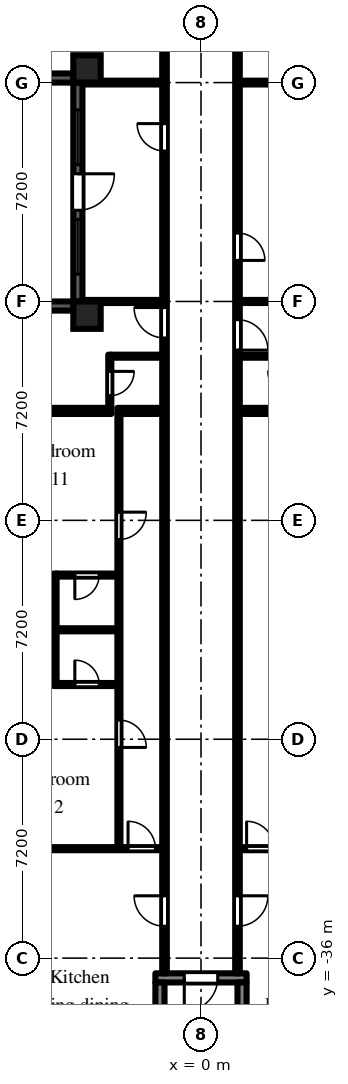
"""IFC4 building model, lengths in metres.
Left out: names, types, materials, properties, quantities, classifications, styles, units other than length and angle.
Written with IfcOpenShell. Run it as: python <this file> out.ifc"""

import sys

from ifc_helpers import new_model, si_unit, direction, frame, frame_2d, origin, origin_2d, place, context, subcontext, project, spatial, rectangle, extrude, element, fill, save


model = new_model("IFC4")
c1 = context("Model", 3, precision=1e-05, world=origin(), true_north=direction((0.0, 1.0)))
c2 = subcontext(c1, "Body", "Model", "MODEL_VIEW")
j1 = project(units=[si_unit("LENGTHUNIT", "METRE"), si_unit("PLANEANGLEUNIT", "RADIAN")], contexts=[c1])
p1 = place(None, origin())
s1 = spatial("IfcSite", under=j1, at=p1, CompositionType="ELEMENT")
p2 = place(p1, origin())
s2 = spatial("IfcBuilding", under=s1, at=p2, CompositionType="ELEMENT")
p3 = place(p2, frame((0.0, 0.0, 29.7)))
s3 = spatial("IfcBuildingStorey", under=s2, at=p3, CompositionType="ELEMENT", Elevation=29.7)
for number, where, z_axis, x_axis in (
    (1, (-3.75, -14.85, 0.0), (0.0, 0.0, 1.0), (1.0, 0.0, 0.0)),
    (2, (-3.75, -6.75, 0.0), (0.0, 0.0, 1.0), (1.0, 0.0, 0.0)),
):
    element("IfcColumn", number, at=place(p3, frame(where, z_axis=z_axis, x_axis=x_axis)), inside=s3, PredefinedType="COLUMN", context=c2, shape_type="SweptSolid", body=[
        extrude(rectangle(XDim=0.9, YDim=0.9, at=origin_2d()), origin(), (0.0, 0.0, 1.0), 3.0),
    ])
p4 = place(p3, frame((-7.2, -7.05, 0.0), z_axis=(0.0, 0.0, 1.0), x_axis=(1.0, 0.0, 0.0)))
e3 = element("IfcWall", 3, at=p4, inside=s3, PredefinedType="SOLIDWALL", context=c2, shape_type="SweptSolid", body=[
    extrude(rectangle(XDim=3.0, YDim=0.3, at=frame_2d((1.5, 0.0))), origin(), (0.0, 0.0, 1.0), 2.1),
])
p5 = place(p3, frame((-4.05, -7.2, 0.0), z_axis=(0.0, 0.0, 1.0), x_axis=(0.0, -1.0, 0.0)))
e4 = element("IfcWall", 4, at=p5, inside=s3, PredefinedType="SOLIDWALL", context=c2, shape_type="SweptSolid", body=[
    extrude(rectangle(XDim=7.2, YDim=0.3, at=frame_2d((3.6, 0.0))), origin(), (0.0, 0.0, 1.0), 2.1),
])
p6 = place(p5, frame((3.0, 0.0, 0.0)))
e5 = element("IfcOpeningElement", 5, at=p6, cuts=e4, PredefinedType="OPENING", context=c2, shape_type="SweptSolid", body=[
    extrude(rectangle(XDim=1.2, YDim=2.05, at=frame_2d((0.6, 1.025))), frame((0.0, 0.16, 0.0), z_axis=(0.0, -1.0, 0.0), x_axis=(1.0, 0.0, 0.0)), (0.0, 0.0, 1.0), 0.32),
])
p7 = place(p5, frame((0.9, 0.0, 0.2)))
e6 = element("IfcOpeningElement", 6, at=p7, cuts=e4, PredefinedType="OPENING", context=c2, shape_type="SweptSolid", body=[
    extrude(rectangle(XDim=1.8, YDim=1.85, at=frame_2d((0.9, 0.925))), frame((0.0, 0.16, 0.0), z_axis=(0.0, -1.0, 0.0), x_axis=(1.0, 0.0, 0.0)), (0.0, 0.0, 1.0), 0.32),
])
p8 = place(p5, frame((4.5, 0.0, 0.2)))
e7 = element("IfcOpeningElement", 7, at=p8, cuts=e4, PredefinedType="OPENING", context=c2, shape_type="SweptSolid", body=[
    extrude(rectangle(XDim=1.8, YDim=1.85, at=frame_2d((0.9, 0.925))), frame((0.0, 0.16, 0.0), z_axis=(0.0, -1.0, 0.0), x_axis=(1.0, 0.0, 0.0)), (0.0, 0.0, 1.0), 0.32),
])
p9 = place(p3, frame((-4.2, -14.55, 0.0), z_axis=(0.0, 0.0, 1.0), x_axis=(-1.0, 0.0, 0.0)))
e8 = element("IfcWall", 8, at=p9, inside=s3, PredefinedType="SOLIDWALL", context=c2, shape_type="SweptSolid", body=[
    extrude(rectangle(XDim=2.1, YDim=0.3, at=frame_2d((1.05, 0.0))), origin(), (0.0, 0.0, 1.0), 2.1),
])
p10 = place(p3, frame((-1.5, -36.65, 0.0), z_axis=(0.0, 0.0, 1.0), x_axis=(1.0, 0.0, 0.0)))
e9 = element("IfcWall", 9, at=p10, inside=s3, PredefinedType="SHEAR", context=c2, shape_type="SweptSolid", body=[
    extrude(rectangle(XDim=3.0, YDim=0.3, at=frame_2d((1.5, 0.0))), origin(), (0.0, 0.0, 1.0), 2.575),
])
p11 = place(p10, frame((0.95, 0.0, 0.0)))
e10 = element("IfcOpeningElement", 10, at=p11, cuts=e9, PredefinedType="OPENING", context=c2, shape_type="SweptSolid", body=[
    extrude(rectangle(XDim=1.1, YDim=2.1, at=frame_2d((0.55, 1.05))), frame((0.0, 0.16, 0.0), z_axis=(0.0, -1.0, 0.0), x_axis=(1.0, 0.0, 0.0)), (0.0, 0.0, 1.0), 0.32),
])
for number, where, z_axis, x_axis in (
    (11, (-1.35, -36.8, 0.0), (0.0, 0.0, 1.0), (0.0, -1.0, 0.0)),
    (12, (1.35, -36.8, 0.0), (0.0, 0.0, 1.0), (0.0, -1.0, 0.0)),
):
    element("IfcWall", number, at=place(p3, frame(where, z_axis=z_axis, x_axis=x_axis)), inside=s3, PredefinedType="SHEAR", context=c2, shape_type="SweptSolid", body=[
        extrude(rectangle(XDim=5.8, YDim=0.3, at=frame_2d((2.9, 0.0))), origin(), (0.0, 0.0, 1.0), 2.575),
    ])
p12 = place(p3, frame((-6.9, -32.4, 0.0), z_axis=(0.0, 0.0, 1.0), x_axis=(1.0, 0.0, 0.0)))
e13 = element("IfcWall", 13, at=p12, inside=s3, PredefinedType="PARTITIONING", context=c2, shape_type="SweptSolid", body=[
    extrude(rectangle(XDim=5.625, YDim=0.1, at=frame_2d((2.812, 0.0))), origin(), (0.0, 0.0, 1.0), 2.575),
])
p13 = place(p12, frame((4.5, 0.0, 0.0)))
e14 = element("IfcOpeningElement", 14, at=p13, cuts=e13, PredefinedType="OPENING", context=c2, shape_type="SweptSolid", body=[
    extrude(rectangle(XDim=0.9, YDim=2.1, at=frame_2d((0.45, 1.05))), frame((0.0, 0.06, 0.0), z_axis=(0.0, -1.0, 0.0), x_axis=(1.0, 0.0, 0.0)), (0.0, 0.0, 1.0), 0.12),
])
p14 = place(p3, frame((-6.9, -25.2, 0.0), z_axis=(0.0, 0.0, 1.0), x_axis=(1.0, 0.0, 0.0)))
e15 = element("IfcWall", 15, at=p14, inside=s3, PredefinedType="PARTITIONING", context=c2, shape_type="SweptSolid", body=[
    extrude(rectangle(XDim=4.15, YDim=0.1, at=frame_2d((2.075, 0.0))), origin(), (0.0, 0.0, 1.0), 2.575),
])
p15 = place(p3, frame((-6.9, -18.0, 0.0), z_axis=(0.0, 0.0, 1.0), x_axis=(1.0, 0.0, 0.0)))
e16 = element("IfcWall", 16, at=p15, inside=s3, PredefinedType="PARTITIONING", context=c2, shape_type="SweptSolid", body=[
    extrude(rectangle(XDim=3.95, YDim=0.2, at=frame_2d((1.975, 0.0))), origin(), (0.0, 0.0, 1.0), 2.575),
])
p16 = place(p3, frame((-4.8, -27.05, 0.0), z_axis=(0.0, 0.0, 1.0), x_axis=(0.0, 1.0, 0.0)))
e17 = element("IfcWall", 17, at=p16, inside=s3, PredefinedType="PARTITIONING", context=c2, shape_type="SweptSolid", body=[
    extrude(rectangle(XDim=3.7, YDim=0.1, at=frame_2d((1.85, 0.0))), origin(), (0.0, 0.0, 1.0), 2.575),
])
p17 = place(p3, frame((-4.75, -27.0, 0.0), z_axis=(0.0, 0.0, 1.0), x_axis=(1.0, 0.0, 0.0)))
e18 = element("IfcWall", 18, at=p17, inside=s3, PredefinedType="PARTITIONING", context=c2, shape_type="SweptSolid", body=[
    extrude(rectangle(XDim=2.0, YDim=0.1, at=frame_2d((1.0, 0.0))), origin(), (0.0, 0.0, 1.0), 2.575),
])
p18 = place(p17, frame((0.6, 0.0, 0.0)))
e19 = element("IfcOpeningElement", 19, at=p18, cuts=e18, PredefinedType="OPENING", context=c2, shape_type="SweptSolid", body=[
    extrude(rectangle(XDim=0.8, YDim=2.1, at=frame_2d((0.4, 1.05))), frame((0.0, 0.06, 0.0), z_axis=(0.0, -1.0, 0.0), x_axis=(1.0, 0.0, 0.0)), (0.0, 0.0, 1.0), 0.12),
])
p19 = place(p3, frame((-4.75, -23.4, 0.0), z_axis=(0.0, 0.0, 1.0), x_axis=(1.0, 0.0, 0.0)))
e20 = element("IfcWall", 20, at=p19, inside=s3, PredefinedType="PARTITIONING", context=c2, shape_type="SweptSolid", body=[
    extrude(rectangle(XDim=2.0, YDim=0.1, at=frame_2d((1.0, 0.0))), origin(), (0.0, 0.0, 1.0), 2.575),
])
p20 = place(p19, frame((0.6, 0.0, 0.0)))
e21 = element("IfcOpeningElement", 21, at=p20, cuts=e20, PredefinedType="OPENING", context=c2, shape_type="SweptSolid", body=[
    extrude(rectangle(XDim=0.8, YDim=2.1, at=frame_2d((0.4, 1.05))), frame((0.0, 0.06, 0.0), z_axis=(0.0, -1.0, 0.0), x_axis=(1.0, 0.0, 0.0)), (0.0, 0.0, 1.0), 0.12),
])
p21 = place(p3, frame((-3.9, -14.4, 0.0), z_axis=(0.0, 0.0, 1.0), x_axis=(1.0, 0.0, 0.0)))
e22 = element("IfcWall", 22, at=p21, inside=s3, PredefinedType="PARTITIONING", context=c2, shape_type="SweptSolid", body=[
    extrude(rectangle(XDim=2.625, YDim=0.1, at=frame_2d((1.312, 0.0))), origin(), (0.0, 0.0, 1.0), 2.575),
])
p22 = place(p3, frame((-3.9, -7.2, 0.0), z_axis=(0.0, 0.0, 1.0), x_axis=(1.0, 0.0, 0.0)))
e23 = element("IfcWall", 23, at=p22, inside=s3, PredefinedType="PARTITIONING", context=c2, shape_type="SweptSolid", body=[
    extrude(rectangle(XDim=2.625, YDim=0.125, at=frame_2d((1.312, 0.0))), origin(), (0.0, 0.0, 1.0), 2.575),
])
p23 = place(p3, frame((-3.0, -17.9, 0.0), z_axis=(0.0, 0.0, 1.0), x_axis=(0.0, 1.0, 0.0)))
e24 = element("IfcWall", 24, at=p23, inside=s3, PredefinedType="PARTITIONING", context=c2, shape_type="SweptSolid", body=[
    extrude(rectangle(XDim=1.75, YDim=0.1, at=frame_2d((0.875, 0.0))), origin(), (0.0, 0.0, 1.0), 2.575),
])
p24 = place(p23, frame((0.4, 0.0, 0.0)))
e25 = element("IfcOpeningElement", 25, at=p24, cuts=e24, PredefinedType="OPENING", context=c2, shape_type="SweptSolid", body=[
    extrude(rectangle(XDim=0.8, YDim=2.1, at=frame_2d((0.4, 1.05))), frame((0.0, 0.06, 0.0), z_axis=(0.0, -1.0, 0.0), x_axis=(1.0, 0.0, 0.0)), (0.0, 0.0, 1.0), 0.12),
])
p25 = place(p3, frame((-2.95, -16.2, 0.0), z_axis=(0.0, 0.0, 1.0), x_axis=(1.0, 0.0, 0.0)))
e26 = element("IfcWall", 26, at=p25, inside=s3, PredefinedType="PARTITIONING", context=c2, shape_type="SweptSolid", body=[
    extrude(rectangle(XDim=1.675, YDim=0.1, at=frame_2d((0.837, 0.0))), origin(), (0.0, 0.0, 1.0), 2.575),
])
p26 = place(p3, frame((-2.7, -32.35, 0.0), z_axis=(0.0, 0.0, 1.0), x_axis=(0.0, 1.0, 0.0)))
e27 = element("IfcWall", 27, at=p26, inside=s3, PredefinedType="PARTITIONING", context=c2, shape_type="SweptSolid", body=[
    extrude(rectangle(XDim=14.25, YDim=0.1, at=frame_2d((7.125, 0.0))), origin(), (0.0, 0.0, 1.0), 2.575),
])
p27 = place(p26, frame((3.28, 0.0, 0.0)))
e28 = element("IfcOpeningElement", 28, at=p27, cuts=e27, PredefinedType="OPENING", context=c2, shape_type="SweptSolid", body=[
    extrude(rectangle(XDim=0.9, YDim=2.1, at=frame_2d((0.45, 1.05))), frame((0.0, 0.06, 0.0), z_axis=(0.0, -1.0, 0.0), x_axis=(1.0, 0.0, 0.0)), (0.0, 0.0, 1.0), 0.12),
])
p28 = place(p26, frame((10.12, 0.0, 0.0)))
e29 = element("IfcOpeningElement", 29, at=p28, cuts=e27, PredefinedType="OPENING", context=c2, shape_type="SweptSolid", body=[
    extrude(rectangle(XDim=0.9, YDim=2.1, at=frame_2d((0.45, 1.05))), frame((0.0, 0.06, 0.0), z_axis=(0.0, -1.0, 0.0), x_axis=(1.0, 0.0, 0.0)), (0.0, 0.0, 1.0), 0.12),
])
p29 = place(p3, frame((-2.75, -18.0, 0.0), z_axis=(0.0, 0.0, 1.0), x_axis=(1.0, 0.0, 0.0)))
e30 = element("IfcWall", 30, at=p29, inside=s3, PredefinedType="PARTITIONING", context=c2, shape_type="SweptSolid", body=[
    extrude(rectangle(XDim=1.475, YDim=0.2, at=frame_2d((0.738, 0.0))), origin(), (0.0, 0.0, 1.0), 2.575),
])
p30 = place(p3, frame((-1.2, -36.5, 0.0), z_axis=(0.0, 0.0, 1.0), x_axis=(0.0, 1.0, 0.0)))
e31 = element("IfcWall", 31, at=p30, inside=s3, PredefinedType="PARTITIONING", context=c2, shape_type="SweptSolid", body=[
    extrude(rectangle(XDim=35.375, YDim=0.15, at=frame_2d((17.688, 0.0))), origin(), (0.0, 0.0, 1.0), 2.575),
])
p31 = place(p30, frame((33.65, 0.0, 0.0)))
e32 = element("IfcOpeningElement", 32, at=p31, cuts=e31, PredefinedType="OPENING", context=c2, shape_type="SweptSolid", body=[
    extrude(rectangle(XDim=0.9, YDim=2.1, at=frame_2d((0.45, 1.05))), frame((0.0, 0.085, 0.0), z_axis=(0.0, -1.0, 0.0), x_axis=(1.0, 0.0, 0.0)), (0.0, 0.0, 1.0), 0.17),
])
p32 = place(p30, frame((30.65, 0.0, 0.0)))
e33 = element("IfcOpeningElement", 33, at=p32, cuts=e31, PredefinedType="OPENING", context=c2, shape_type="SweptSolid", body=[
    extrude(rectangle(XDim=0.9, YDim=2.1, at=frame_2d((0.45, 1.05))), frame((0.0, 0.085, 0.0), z_axis=(0.0, -1.0, 0.0), x_axis=(1.0, 0.0, 0.0)), (0.0, 0.0, 1.0), 0.17),
])
p33 = place(p30, frame((27.05, 0.0, 0.0)))
e34 = element("IfcOpeningElement", 34, at=p33, cuts=e31, PredefinedType="OPENING", context=c2, shape_type="SweptSolid", body=[
    extrude(rectangle(XDim=0.9, YDim=2.1, at=frame_2d((0.45, 1.05))), frame((0.0, 0.085, 0.0), z_axis=(0.0, -1.0, 0.0), x_axis=(1.0, 0.0, 0.0)), (0.0, 0.0, 1.0), 0.17),
])
p34 = place(p30, frame((20.9, 0.0, 0.0)))
e35 = element("IfcOpeningElement", 35, at=p34, cuts=e31, PredefinedType="OPENING", context=c2, shape_type="SweptSolid", body=[
    extrude(rectangle(XDim=1.0, YDim=2.1, at=frame_2d((0.5, 1.05))), frame((0.0, 0.085, 0.0), z_axis=(0.0, -1.0, 0.0), x_axis=(1.0, 0.0, 0.0)), (0.0, 0.0, 1.0), 0.17),
])
p35 = place(p30, frame((1.55, 0.0, 0.0)))
e36 = element("IfcOpeningElement", 36, at=p35, cuts=e31, PredefinedType="OPENING", context=c2, shape_type="SweptSolid", body=[
    extrude(rectangle(XDim=1.0, YDim=2.1, at=frame_2d((0.5, 1.05))), frame((0.0, 0.085, 0.0), z_axis=(0.0, -1.0, 0.0), x_axis=(1.0, 0.0, 0.0)), (0.0, 0.0, 1.0), 0.17),
])
p36 = place(p3, frame((1.2, -36.5, 0.0), z_axis=(0.0, 0.0, 1.0), x_axis=(0.0, 1.0, 0.0)))
e37 = element("IfcWall", 37, at=p36, inside=s3, PredefinedType="PARTITIONING", context=c2, shape_type="SweptSolid", body=[
    extrude(rectangle(XDim=35.375, YDim=0.15, at=frame_2d((17.688, 0.0))), origin(), (0.0, 0.0, 1.0), 2.575),
])
p37 = place(p36, frame((31.85, 0.0, 0.0)))
e38 = element("IfcOpeningElement", 38, at=p37, cuts=e37, PredefinedType="OPENING", context=c2, shape_type="SweptSolid", body=[
    extrude(rectangle(XDim=0.9, YDim=2.1, at=frame_2d((0.45, 1.05))), frame((0.0, 0.085, 0.0), z_axis=(0.0, -1.0, 0.0), x_axis=(1.0, 0.0, 0.0)), (0.0, 0.0, 1.0), 0.17),
])
p38 = place(p36, frame((23.45, 0.0, 0.0)))
e39 = element("IfcOpeningElement", 39, at=p38, cuts=e37, PredefinedType="OPENING", context=c2, shape_type="SweptSolid", body=[
    extrude(rectangle(XDim=0.9, YDim=2.1, at=frame_2d((0.45, 1.05))), frame((0.0, 0.085, 0.0), z_axis=(0.0, -1.0, 0.0), x_axis=(1.0, 0.0, 0.0)), (0.0, 0.0, 1.0), 0.17),
])
p39 = place(p36, frame((20.5, 0.0, 0.0)))
e40 = element("IfcOpeningElement", 40, at=p39, cuts=e37, PredefinedType="OPENING", context=c2, shape_type="SweptSolid", body=[
    extrude(rectangle(XDim=1.0, YDim=2.1, at=frame_2d((0.5, 1.05))), frame((0.0, 0.085, 0.0), z_axis=(0.0, -1.0, 0.0), x_axis=(1.0, 0.0, 0.0)), (0.0, 0.0, 1.0), 0.17),
])
p40 = place(p36, frame((1.55, 0.0, 0.0)))
e41 = element("IfcOpeningElement", 41, at=p40, cuts=e37, PredefinedType="OPENING", context=c2, shape_type="SweptSolid", body=[
    extrude(rectangle(XDim=1.0, YDim=2.1, at=frame_2d((0.5, 1.05))), frame((0.0, 0.085, 0.0), z_axis=(0.0, -1.0, 0.0), x_axis=(1.0, 0.0, 0.0)), (0.0, 0.0, 1.0), 0.17),
])
p41 = place(p3, frame((1.275, -32.4, 0.0), z_axis=(0.0, 0.0, 1.0), x_axis=(1.0, 0.0, 0.0)))
e42 = element("IfcWall", 42, at=p41, inside=s3, PredefinedType="PARTITIONING", context=c2, shape_type="SweptSolid", body=[
    extrude(rectangle(XDim=5.625, YDim=0.1, at=frame_2d((2.812, 0.0))), origin(), (0.0, 0.0, 1.0), 2.575),
])
p42 = place(p41, frame((0.225, 0.0, 0.0)))
e43 = element("IfcOpeningElement", 43, at=p42, cuts=e42, PredefinedType="OPENING", context=c2, shape_type="SweptSolid", body=[
    extrude(rectangle(XDim=0.9, YDim=2.1, at=frame_2d((0.45, 1.05))), frame((0.0, 0.06, 0.0), z_axis=(0.0, -1.0, 0.0), x_axis=(1.0, 0.0, 0.0)), (0.0, 0.0, 1.0), 0.12),
])
p43 = place(p3, frame((1.275, -18.0, 0.0), z_axis=(0.0, 0.0, 1.0), x_axis=(1.0, 0.0, 0.0)))
e44 = element("IfcWall", 44, at=p43, inside=s3, PredefinedType="PARTITIONING", context=c2, shape_type="SweptSolid", body=[
    extrude(rectangle(XDim=1.475, YDim=0.2, at=frame_2d((0.738, 0.0))), origin(), (0.0, 0.0, 1.0), 2.575),
])
p44 = place(p3, frame((1.275, -16.2, 0.0), z_axis=(0.0, 0.0, 1.0), x_axis=(1.0, 0.0, 0.0)))
e45 = element("IfcWall", 45, at=p44, inside=s3, PredefinedType="PARTITIONING", context=c2, shape_type="SweptSolid", body=[
    extrude(rectangle(XDim=1.775, YDim=0.1, at=frame_2d((0.888, 0.0))), origin(), (0.0, 0.0, 1.0), 2.575),
])
p45 = place(p3, frame((1.275, -14.4, 0.0), z_axis=(0.0, 0.0, 1.0), x_axis=(1.0, 0.0, 0.0)))
e46 = element("IfcWall", 46, at=p45, inside=s3, PredefinedType="PARTITIONING", context=c2, shape_type="SweptSolid", body=[
    extrude(rectangle(XDim=2.625, YDim=0.1, at=frame_2d((1.312, 0.0))), origin(), (0.0, 0.0, 1.0), 2.575),
])
p46 = place(p3, frame((1.275, -7.2, 0.0), z_axis=(0.0, 0.0, 1.0), x_axis=(1.0, 0.0, 0.0)))
e47 = element("IfcWall", 47, at=p46, inside=s3, PredefinedType="PARTITIONING", context=c2, shape_type="SweptSolid", body=[
    extrude(rectangle(XDim=2.625, YDim=0.125, at=frame_2d((1.312, 0.0))), origin(), (0.0, 0.0, 1.0), 2.575),
])
p47 = place(p6, origin())
e48 = element("IfcDoor", 48, at=p47, inside=s3, OperationType="SINGLE_SWING_LEFT", PredefinedType="DOOR", context=c2, shape_type="SweptSolid", body=[
    extrude(rectangle(XDim=1.2, YDim=2.05, at=frame_2d((0.6, 1.025))), frame((0.0, 0.025, 0.0), z_axis=(0.0, -1.0, 0.0), x_axis=(1.0, 0.0, 0.0)), (0.0, 0.0, 1.0), 0.05),
])
fill(e5, e48)
p48 = place(p7, origin())
e49 = element("IfcWindow", 49, at=p48, inside=s3, PartitioningType="SINGLE_PANEL", PredefinedType="WINDOW", context=c2, shape_type="SweptSolid", body=[
    extrude(rectangle(XDim=1.8, YDim=1.85, at=frame_2d((0.9, 0.925))), frame((0.0, 0.03, 0.0), z_axis=(0.0, -1.0, 0.0), x_axis=(1.0, 0.0, 0.0)), (0.0, 0.0, 1.0), 0.06),
])
fill(e6, e49)
p49 = place(p8, origin())
e50 = element("IfcWindow", 50, at=p49, inside=s3, PartitioningType="SINGLE_PANEL", PredefinedType="WINDOW", context=c2, shape_type="SweptSolid", body=[
    extrude(rectangle(XDim=1.8, YDim=1.85, at=frame_2d((0.9, 0.925))), frame((0.0, 0.03, 0.0), z_axis=(0.0, -1.0, 0.0), x_axis=(1.0, 0.0, 0.0)), (0.0, 0.0, 1.0), 0.06),
])
fill(e7, e50)
p50 = place(p11, frame((1.1, 0.0, 0.0), z_axis=(0.0, 0.0, 1.0), x_axis=(-1.0, 0.0, 0.0)))
e51 = element("IfcDoor", 51, at=p50, inside=s3, OperationType="SINGLE_SWING_RIGHT", PredefinedType="DOOR", context=c2, shape_type="SweptSolid", body=[
    extrude(rectangle(XDim=1.1, YDim=2.1, at=frame_2d((0.55, 1.05))), frame((0.0, 0.025, 0.0), z_axis=(0.0, -1.0, 0.0), x_axis=(1.0, 0.0, 0.0)), (0.0, 0.0, 1.0), 0.05),
])
fill(e10, e51)
p51 = place(p38, frame((0.9, 0.0, 0.0), z_axis=(0.0, 0.0, 1.0), x_axis=(-1.0, 0.0, 0.0)))
e52 = element("IfcDoor", 52, at=p51, inside=s3, OperationType="SINGLE_SWING_RIGHT", PredefinedType="DOOR", context=c2, shape_type="SweptSolid", body=[
    extrude(rectangle(XDim=0.9, YDim=2.1, at=frame_2d((0.45, 1.05))), frame((0.0, 0.025, 0.0), z_axis=(0.0, -1.0, 0.0), x_axis=(1.0, 0.0, 0.0)), (0.0, 0.0, 1.0), 0.05),
])
fill(e39, e52)
p52 = place(p39, frame((1.0, 0.0, 0.0), z_axis=(0.0, 0.0, 1.0), x_axis=(-1.0, 0.0, 0.0)))
e53 = element("IfcDoor", 53, at=p52, inside=s3, OperationType="SINGLE_SWING_RIGHT", PredefinedType="DOOR", context=c2, shape_type="SweptSolid", body=[
    extrude(rectangle(XDim=1.0, YDim=2.1, at=frame_2d((0.5, 1.05))), frame((0.0, 0.025, 0.0), z_axis=(0.0, -1.0, 0.0), x_axis=(1.0, 0.0, 0.0)), (0.0, 0.0, 1.0), 0.05),
])
fill(e40, e53)
p53 = place(p40, frame((1.0, 0.0, 0.0), z_axis=(0.0, 0.0, 1.0), x_axis=(-1.0, 0.0, 0.0)))
e54 = element("IfcDoor", 54, at=p53, inside=s3, OperationType="SINGLE_SWING_LEFT", PredefinedType="DOOR", context=c2, shape_type="SweptSolid", body=[
    extrude(rectangle(XDim=1.0, YDim=2.1, at=frame_2d((0.5, 1.05))), frame((0.0, 0.025, 0.0), z_axis=(0.0, -1.0, 0.0), x_axis=(1.0, 0.0, 0.0)), (0.0, 0.0, 1.0), 0.05),
])
fill(e41, e54)
p54 = place(p42, origin())
e55 = element("IfcDoor", 55, at=p54, inside=s3, OperationType="SINGLE_SWING_LEFT", PredefinedType="DOOR", context=c2, shape_type="SweptSolid", body=[
    extrude(rectangle(XDim=0.9, YDim=2.1, at=frame_2d((0.45, 1.05))), frame((0.0, 0.025, 0.0), z_axis=(0.0, -1.0, 0.0), x_axis=(1.0, 0.0, 0.0)), (0.0, 0.0, 1.0), 0.05),
])
fill(e43, e55)
p55 = place(p33, origin())
e56 = element("IfcDoor", 56, at=p55, inside=s3, OperationType="SINGLE_SWING_RIGHT", PredefinedType="DOOR", context=c2, shape_type="SweptSolid", body=[
    extrude(rectangle(XDim=0.9, YDim=2.1, at=frame_2d((0.45, 1.05))), frame((0.0, 0.025, 0.0), z_axis=(0.0, -1.0, 0.0), x_axis=(1.0, 0.0, 0.0)), (0.0, 0.0, 1.0), 0.05),
])
fill(e34, e56)
p56 = place(p24, frame((0.8, 0.0, 0.0), z_axis=(0.0, 0.0, 1.0), x_axis=(-1.0, 0.0, 0.0)))
e57 = element("IfcDoor", 57, at=p56, inside=s3, OperationType="SINGLE_SWING_LEFT", PredefinedType="DOOR", context=c2, shape_type="SweptSolid", body=[
    extrude(rectangle(XDim=0.8, YDim=2.1, at=frame_2d((0.4, 1.05))), frame((0.0, 0.025, 0.0), z_axis=(0.0, -1.0, 0.0), x_axis=(1.0, 0.0, 0.0)), (0.0, 0.0, 1.0), 0.05),
])
fill(e25, e57)
p57 = place(p34, origin())
e58 = element("IfcDoor", 58, at=p57, inside=s3, OperationType="SINGLE_SWING_RIGHT", PredefinedType="DOOR", context=c2, shape_type="SweptSolid", body=[
    extrude(rectangle(XDim=1.0, YDim=2.1, at=frame_2d((0.5, 1.05))), frame((0.0, 0.025, 0.0), z_axis=(0.0, -1.0, 0.0), x_axis=(1.0, 0.0, 0.0)), (0.0, 0.0, 1.0), 0.05),
])
fill(e35, e58)
p58 = place(p35, origin())
e59 = element("IfcDoor", 59, at=p58, inside=s3, OperationType="SINGLE_SWING_RIGHT", PredefinedType="DOOR", context=c2, shape_type="SweptSolid", body=[
    extrude(rectangle(XDim=1.0, YDim=2.1, at=frame_2d((0.5, 1.05))), frame((0.0, 0.025, 0.0), z_axis=(0.0, -1.0, 0.0), x_axis=(1.0, 0.0, 0.0)), (0.0, 0.0, 1.0), 0.05),
])
fill(e36, e59)
p59 = place(p27, frame((0.9, 0.0, 0.0), z_axis=(0.0, 0.0, 1.0), x_axis=(-1.0, 0.0, 0.0)))
e60 = element("IfcDoor", 60, at=p59, inside=s3, OperationType="SINGLE_SWING_RIGHT", PredefinedType="DOOR", context=c2, shape_type="SweptSolid", body=[
    extrude(rectangle(XDim=0.9, YDim=2.1, at=frame_2d((0.45, 1.05))), frame((0.0, 0.025, 0.0), z_axis=(0.0, -1.0, 0.0), x_axis=(1.0, 0.0, 0.0)), (0.0, 0.0, 1.0), 0.05),
])
fill(e28, e60)
p60 = place(p28, frame((0.9, 0.0, 0.0), z_axis=(0.0, 0.0, 1.0), x_axis=(-1.0, 0.0, 0.0)))
e61 = element("IfcDoor", 61, at=p60, inside=s3, OperationType="SINGLE_SWING_LEFT", PredefinedType="DOOR", context=c2, shape_type="SweptSolid", body=[
    extrude(rectangle(XDim=0.9, YDim=2.1, at=frame_2d((0.45, 1.05))), frame((0.0, 0.025, 0.0), z_axis=(0.0, -1.0, 0.0), x_axis=(1.0, 0.0, 0.0)), (0.0, 0.0, 1.0), 0.05),
])
fill(e29, e61)
p61 = place(p13, origin())
e62 = element("IfcDoor", 62, at=p61, inside=s3, OperationType="SINGLE_SWING_LEFT", PredefinedType="DOOR", context=c2, shape_type="SweptSolid", body=[
    extrude(rectangle(XDim=0.9, YDim=2.1, at=frame_2d((0.45, 1.05))), frame((0.0, 0.025, 0.0), z_axis=(0.0, -1.0, 0.0), x_axis=(1.0, 0.0, 0.0)), (0.0, 0.0, 1.0), 0.05),
])
fill(e14, e62)
p62 = place(p20, frame((0.8, 0.0, 0.0), z_axis=(0.0, 0.0, 1.0), x_axis=(-1.0, 0.0, 0.0)))
e63 = element("IfcDoor", 63, at=p62, inside=s3, OperationType="SINGLE_SWING_RIGHT", PredefinedType="DOOR", context=c2, shape_type="SweptSolid", body=[
    extrude(rectangle(XDim=0.8, YDim=2.1, at=frame_2d((0.4, 1.05))), frame((0.0, 0.025, 0.0), z_axis=(0.0, -1.0, 0.0), x_axis=(1.0, 0.0, 0.0)), (0.0, 0.0, 1.0), 0.05),
])
fill(e21, e63)
p63 = place(p18, origin())
e64 = element("IfcDoor", 64, at=p63, inside=s3, OperationType="SINGLE_SWING_LEFT", PredefinedType="DOOR", context=c2, shape_type="SweptSolid", body=[
    extrude(rectangle(XDim=0.8, YDim=2.1, at=frame_2d((0.4, 1.05))), frame((0.0, 0.025, 0.0), z_axis=(0.0, -1.0, 0.0), x_axis=(1.0, 0.0, 0.0)), (0.0, 0.0, 1.0), 0.05),
])
fill(e19, e64)
save(model, sys.argv[1])
